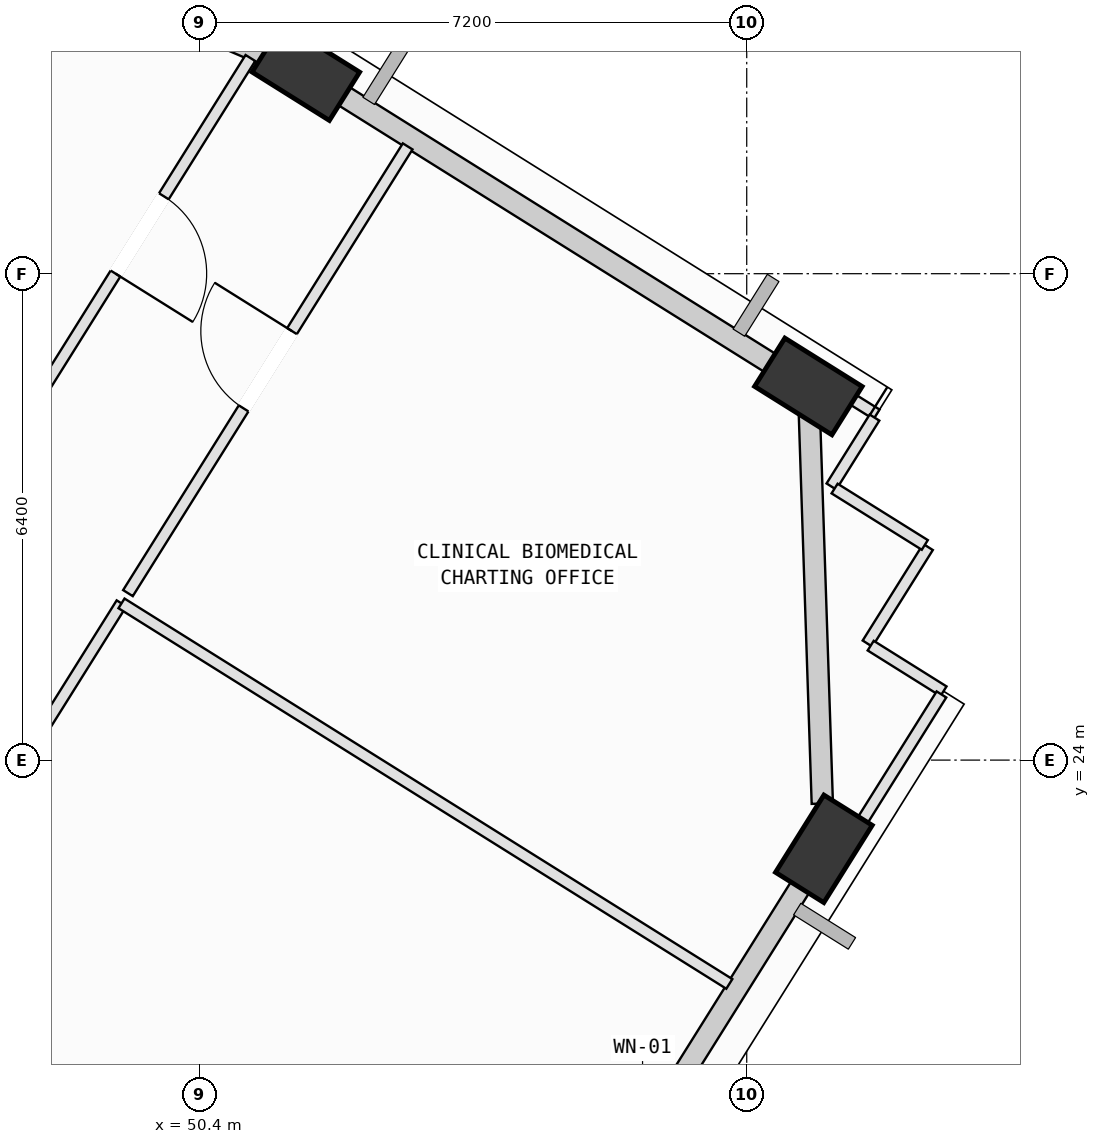
"""IFC4 building model, lengths in metres.
Left out: names, types, materials, properties, quantities, classifications, styles, units other than length and angle.
Written with IfcOpenShell. Run it as: python <this file> out.ifc"""

import sys

from ifc_helpers import new_model, si_unit, direction, frame, frame_2d, origin, origin_2d, place, context, subcontext, project, spatial, rectangle, extrude, element, fill, save


model = new_model("IFC4")
c1 = context("Model", 3, precision=1e-05, world=origin(), true_north=direction((0.0, 1.0)))
c2 = subcontext(c1, "Body", "Model", "MODEL_VIEW")
j1 = project(units=[si_unit("LENGTHUNIT", "METRE"), si_unit("PLANEANGLEUNIT", "RADIAN")], contexts=[c1])
p1 = place(None, origin())
s1 = spatial("IfcSite", under=j1, at=p1, CompositionType="ELEMENT")
p2 = place(p1, origin())
s2 = spatial("IfcBuilding", under=s1, at=p2, CompositionType="ELEMENT")
p3 = place(p2, frame((0.0, 0.0, 272.6)))
s3 = spatial("IfcBuildingStorey", under=s2, at=p3, CompositionType="ELEMENT", Elevation=272.6)
p4 = place(p3, frame((58.615, 22.833, 0.076), z_axis=(0.007305287908, 0.103202669001, 0.994633521394), x_axis=(-0.588860753256, -0.803463214161, 0.087691942418)))
e1 = element("IfcColumn", 1, at=p4, inside=s3, PredefinedType="COLUMN", context=c2, shape_type="SweptSolid", body=[
    extrude(rectangle(XDim=1.2, YDim=0.75, at=origin_2d()), origin(), (0.0, 0.0, 1.0), 3.944),
])
p5 = place(p3, frame((58.411, 28.917, 0.068), z_axis=(-0.017734439579, 0.102142956879, 0.994611635772), x_axis=(0.925379569518, -0.375028147347, 0.055014007456)))
e2 = element("IfcColumn", 2, at=p5, inside=s3, PredefinedType="COLUMN", context=c2, shape_type="SweptSolid", body=[
    extrude(rectangle(XDim=1.2, YDim=0.75, at=origin_2d()), origin(), (0.0, 0.0, 1.0), 3.951),
])
p6 = place(p3, frame((51.799, 33.053, 0.055), z_axis=(-0.034677853614, 0.074909100156, 0.996587213034), x_axis=(0.991334077794, -0.123846479581, 0.043804060302)))
e3 = element("IfcColumn", 3, at=p6, inside=s3, PredefinedType="COLUMN", context=c2, shape_type="SweptSolid", body=[
    extrude(rectangle(XDim=1.2, YDim=0.75, at=origin_2d()), origin(), (0.0, 0.0, 1.0), 3.957),
])
p7 = place(p3, frame((58.507, 22.654, 0.0), z_axis=(0.0, 0.0, 1.0), x_axis=(-0.530658662943, -0.847585620125, 0.0)))
e4 = element("IfcWall", 4, at=p7, inside=s3, PredefinedType="SOLIDWALL", context=c2, shape_type="SweptSolid", body=[
    extrude(rectangle(XDim=6.418, YDim=0.28, at=frame_2d((3.209, 0.0))), origin(), (0.0, 0.0, 1.0), 3.265),
])
p8 = place(p7, frame((3.493, 0.0, 0.75)))
e5 = element("IfcOpeningElement", 5, at=p8, cuts=e4, PredefinedType="OPENING", context=c2, shape_type="SweptSolid", body=[
    extrude(rectangle(XDim=1.6, YDim=1.95, at=frame_2d((0.8, 0.975))), frame((0.0, 0.15, 0.0), z_axis=(0.0, -1.0, 0.0), x_axis=(1.0, 0.0, 0.0)), (0.0, 0.0, 1.0), 0.3),
])
p9 = place(p3, frame((58.419, 28.719, 0.0), z_axis=(0.0, 0.0, 1.0), x_axis=(0.033204271965, -0.999448586133, 0.0)))
e6 = element("IfcWall", 6, at=p9, inside=s3, PredefinedType="SOLIDWALL", context=c2, shape_type="SweptSolid", body=[
    extrude(rectangle(XDim=5.294, YDim=0.28, at=frame_2d((2.647, 0.0))), origin(), (0.0, 0.0, 1.0), 3.265),
])
p10 = place(p3, frame((52.012, 32.917, 0.0), z_axis=(0.0, 0.0, 1.0), x_axis=(0.847583441626, -0.530662142499, 0.0)))
e7 = element("IfcWall", 7, at=p10, inside=s3, PredefinedType="SOLIDWALL", context=c2, shape_type="SweptSolid", body=[
    extrude(rectangle(XDim=7.046, YDim=0.28, at=frame_2d((3.523, 0.0))), origin(), (0.0, 0.0, 1.0), 3.265),
])
p11 = place(p3, frame((43.035, 36.816, 0.0), z_axis=(0.0, 0.0, 1.0), x_axis=(0.918725262251, -0.394897318935, 0.0)))
e8 = element("IfcWall", 8, at=p11, inside=s3, PredefinedType="SOLIDWALL", context=c2, shape_type="SweptSolid", body=[
    extrude(rectangle(XDim=9.036, YDim=0.28, at=frame_2d((4.518, 0.0))), origin(), (0.0, 0.0, 1.0), 3.265),
])
p12 = place(p3, frame((42.878, 15.687, 0.0), z_axis=(0.0, 0.0, 1.0), x_axis=(0.530687191851, 0.847567758002, 0.0)))
e9 = element("IfcWall", 9, at=p12, inside=s3, PredefinedType="PARTITIONING", context=c2, shape_type="SweptSolid", body=[
    extrude(rectangle(XDim=12.241, YDim=0.15, at=frame_2d((6.121, 0.0))), origin(), (0.0, 0.0, 1.0), 3.415),
])
p13 = place(p12, frame((5.521, 0.0, 0.0)))
e10 = element("IfcOpeningElement", 10, at=p13, cuts=e9, PredefinedType="OPENING", context=c2, shape_type="SweptSolid", body=[
    extrude(rectangle(XDim=1.2, YDim=2.15, at=frame_2d((0.6, 1.075))), frame((0.0, 0.085, 0.0), z_axis=(0.0, -1.0, 0.0), x_axis=(1.0, 0.0, 0.0)), (0.0, 0.0, 1.0), 0.17),
])
p14 = place(p3, frame((49.374, 26.062, 0.0), z_axis=(0.0, 0.0, 1.0), x_axis=(0.847573559708, -0.530677925756, 0.0)))
e11 = element("IfcWall", 11, at=p14, inside=s3, PredefinedType="PARTITIONING", context=c2, shape_type="SweptSolid", body=[
    extrude(rectangle(XDim=9.435, YDim=0.15, at=frame_2d((4.718, 0.0))), origin(), (0.0, 0.0, 1.0), 3.78),
])
p15 = place(p3, frame((59.985, 26.804, 0.0), z_axis=(0.0, 0.0, 1.0), x_axis=(-0.530847360181, -0.847467450814, 0.0)))
e12 = element("IfcWall", 12, at=p15, inside=s3, PredefinedType="PARTITIONING", context=c2, shape_type="SweptSolid", body=[
    extrude(rectangle(XDim=1.5, YDim=0.15, at=frame_2d((0.75, 0.0))), origin(), (0.0, 0.0, 1.0), 3.78),
])
p16 = place(p3, frame((59.231, 25.506, 0.0), z_axis=(0.0, 0.0, 1.0), x_axis=(0.847464016809, -0.530852842334, 0.0)))
e13 = element("IfcWall", 13, at=p16, inside=s3, PredefinedType="PARTITIONING", context=c2, shape_type="SweptSolid", body=[
    extrude(rectangle(XDim=1.13, YDim=0.15, at=frame_2d((0.565, 0.0))), origin(), (0.0, 0.0, 1.0), 3.78),
])
p17 = place(p3, frame((60.162, 24.864, 0.0), z_axis=(0.0, 0.0, 1.0), x_axis=(-0.530700631331, -0.847559342999, 0.0)))
e14 = element("IfcWall", 14, at=p17, inside=s3, PredefinedType="PARTITIONING", context=c2, shape_type="SweptSolid", body=[
    extrude(rectangle(XDim=2.751, YDim=0.15, at=frame_2d((1.376, 0.0))), origin(), (0.0, 0.0, 1.0), 3.265),
])
p18 = place(p3, frame((49.459, 26.197, 0.0), z_axis=(0.0, 0.0, 1.0), x_axis=(0.530644342524, 0.847594585723, 0.0)))
e15 = element("IfcWall", 15, at=p18, inside=s3, PredefinedType="PARTITIONING", context=c2, shape_type="SweptSolid", body=[
    extrude(rectangle(XDim=6.935, YDim=0.15, at=frame_2d((3.467, 0.0))), origin(), (0.0, 0.0, 1.0), 3.78),
])
p19 = place(p18, frame((2.867, 0.0, 0.0)))
e16 = element("IfcOpeningElement", 16, at=p19, cuts=e15, PredefinedType="OPENING", context=c2, shape_type="SweptSolid", body=[
    extrude(rectangle(XDim=1.2, YDim=2.15, at=frame_2d((0.6, 1.075))), frame((0.0, 0.085, 0.0), z_axis=(0.0, -1.0, 0.0), x_axis=(1.0, 0.0, 0.0)), (0.0, 0.0, 1.0), 0.17),
])
p20 = place(p3, frame((58.074, 29.321, 0.0), z_axis=(0.0, 0.0, 1.0), x_axis=(0.847800378652, -0.53031548908, 0.0)))
e17 = element("IfcWall", 17, at=p20, inside=s3, PredefinedType="PARTITIONING", context=c2, shape_type="SweptSolid", body=[
    extrude(rectangle(XDim=1.456, YDim=0.15, at=frame_2d((0.728, 0.0))), origin(), (0.0, 0.0, 1.0), 3.265),
])
p21 = place(p3, frame((59.281, 28.507, 0.0), z_axis=(0.0, 0.0, 1.0), x_axis=(-0.530019457591, -0.847985480168, 0.0)))
e18 = element("IfcWall", 18, at=p21, inside=s3, PredefinedType="PARTITIONING", context=c2, shape_type="SweptSolid", body=[
    extrude(rectangle(XDim=1.07, YDim=0.15, at=frame_2d((0.535, 0.0))), origin(), (0.0, 0.0, 1.0), 3.78),
])
p22 = place(p3, frame((58.756, 27.573, 0.0), z_axis=(0.0, 0.0, 1.0), x_axis=(0.847978706859, -0.530030294147, 0.0)))
e19 = element("IfcWall", 19, at=p22, inside=s3, PredefinedType="PARTITIONING", context=c2, shape_type="SweptSolid", body=[
    extrude(rectangle(XDim=1.4, YDim=0.15, at=frame_2d((0.7, 0.0))), origin(), (0.0, 0.0, 1.0), 3.78),
])
p23 = place(p3, frame((51.07, 33.238, 0.0), z_axis=(0.0, 0.0, 1.0), x_axis=(-0.530530213169, -0.847666026755, 0.0)))
e20 = element("IfcWall", 20, at=p23, inside=s3, PredefinedType="PARTITIONING", context=c2, shape_type="SweptSolid", body=[
    extrude(rectangle(XDim=5.493, YDim=0.15, at=frame_2d((2.746, 0.0))), origin(), (0.0, 0.0, 1.0), 2.765),
])
p24 = place(p23, frame((2.146, 0.0, 0.0)))
e21 = element("IfcOpeningElement", 21, at=p24, cuts=e20, PredefinedType="OPENING", context=c2, shape_type="SweptSolid", body=[
    extrude(rectangle(XDim=1.2, YDim=2.15, at=frame_2d((0.6, 1.075))), frame((0.0, 0.085, 0.0), z_axis=(0.0, -1.0, 0.0), x_axis=(1.0, 0.0, 0.0)), (0.0, 0.0, 1.0), 0.17),
])
p25 = place(p19, origin())
e22 = element("IfcDoor", 22, at=p25, inside=s3, OperationType="SINGLE_SWING_RIGHT", PredefinedType="DOOR", context=c2, shape_type="SweptSolid", body=[
    extrude(rectangle(XDim=1.2, YDim=2.15, at=frame_2d((0.6, 1.075))), frame((0.0, 0.025, 0.0), z_axis=(0.0, -1.0, 0.0), x_axis=(1.0, 0.0, 0.0)), (0.0, 0.0, 1.0), 0.05),
])
fill(e16, e22)
p26 = place(p24, origin())
e23 = element("IfcDoor", 23, at=p26, inside=s3, OperationType="SINGLE_SWING_RIGHT", PredefinedType="DOOR", context=c2, shape_type="SweptSolid", body=[
    extrude(rectangle(XDim=1.2, YDim=2.15, at=frame_2d((0.6, 1.075))), frame((0.0, 0.025, 0.0), z_axis=(0.0, -1.0, 0.0), x_axis=(1.0, 0.0, 0.0)), (0.0, 0.0, 1.0), 0.05),
])
fill(e21, e23)
save(model, sys.argv[1])
